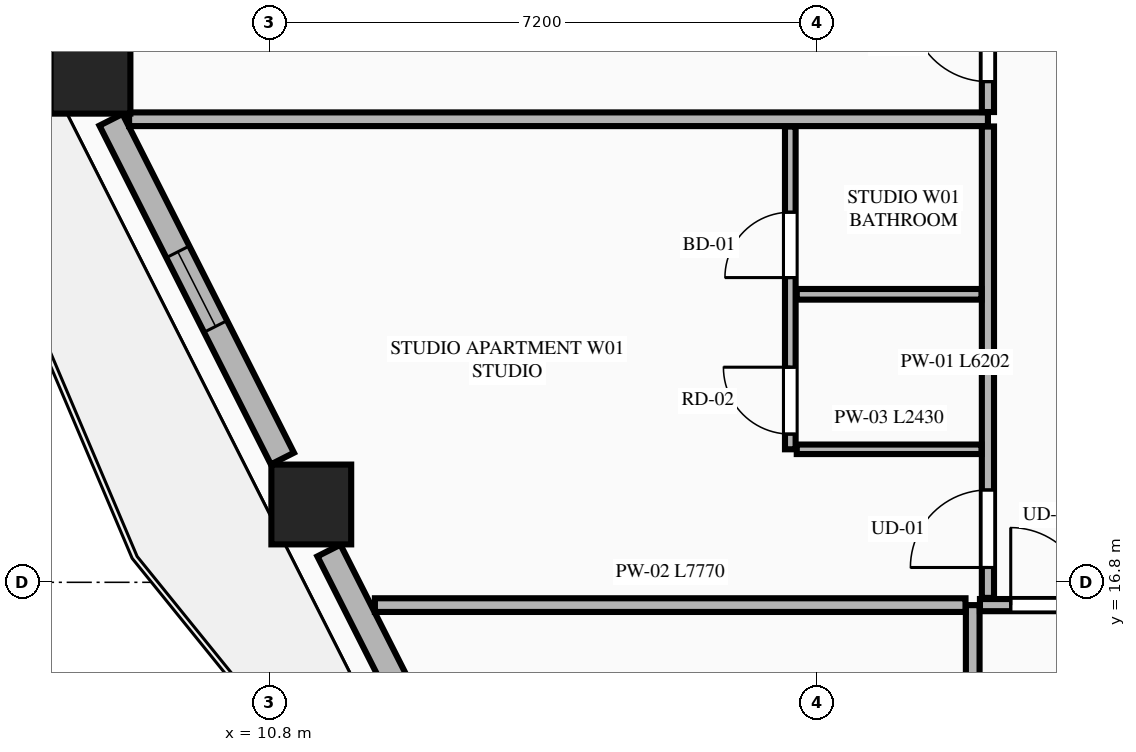
"""IFC4 building model, lengths in metres.
Left out: names, types, materials, properties, quantities, classifications, styles, units other than length and angle.
Written with IfcOpenShell. Run it as: python <this file> out.ifc"""

import sys

from ifc_helpers import new_model, si_unit, direction, frame, frame_2d, origin, origin_2d, place, context, subcontext, project, spatial, rectangle, extrude, element, fill, save


model = new_model("IFC4")
c1 = context("Model", 3, precision=1e-05, world=origin(), true_north=direction((0.0, 1.0)))
c2 = subcontext(c1, "Body", "Model", "MODEL_VIEW")
j1 = project(units=[si_unit("LENGTHUNIT", "METRE"), si_unit("PLANEANGLEUNIT", "RADIAN")], contexts=[c1])
p1 = place(None, origin())
s1 = spatial("IfcSite", under=j1, at=p1, CompositionType="ELEMENT")
p2 = place(p1, origin())
s2 = spatial("IfcBuilding", under=s1, at=p2, CompositionType="ELEMENT")
p3 = place(p2, frame((0.0, 0.0, 133.9)))
s3 = spatial("IfcBuildingStorey", under=s2, at=p3, CompositionType="ELEMENT", Elevation=133.9)
for number, where, z_axis, x_axis in (
    (1, (8.443, 23.491, 0.0), (0.0, 0.0, 1.0), (1.0, 0.0, 0.0)),
    (2, (11.348, 17.824, 0.0), (0.0, 0.0, 1.0), (1.0, 0.0, 0.0)),
):
    element("IfcColumn", number, at=place(p3, frame(where, z_axis=z_axis, x_axis=x_axis)), inside=s3, PredefinedType="COLUMN", context=c2, shape_type="SweptSolid", body=[
        extrude(rectangle(XDim=1.05, YDim=1.05, at=origin_2d()), origin(), (0.0, 0.0, 1.0), 3.55),
    ])
p4 = place(p3, frame((8.713, 22.885, 0.0), z_axis=(0.0, 0.0, 1.0), x_axis=(0.451470533039, -0.892286029139, 0.0)))
e3 = element("IfcWall", 3, at=p4, inside=s3, PredefinedType="STANDARD", context=c2, shape_type="SweptSolid", body=[
    extrude(rectangle(XDim=4.995, YDim=0.34, at=frame_2d((2.498, 0.0))), origin(), (0.0, 0.0, 1.0), 2.797),
])
p5 = place(p4, frame((1.947, 0.0, 0.75)))
e4 = element("IfcOpeningElement", 4, at=p5, cuts=e3, PredefinedType="OPENING", context=c2, shape_type="SweptSolid", body=[
    extrude(rectangle(XDim=1.1, YDim=1.897, at=frame_2d((0.55, 0.948))), frame((0.0, 0.18, 0.0), z_axis=(0.0, -1.0, 0.0), x_axis=(1.0, 0.0, 0.0)), (0.0, 0.0, 1.0), 0.36),
])
p6 = place(p3, frame((11.58, 17.218, 0.0), z_axis=(0.0, 0.0, 1.0), x_axis=(0.451567731634, -0.892236842855, 0.0)))
e5 = element("IfcWall", 5, at=p6, inside=s3, PredefinedType="STANDARD", context=c2, shape_type="SweptSolid", body=[
    extrude(rectangle(XDim=5.219, YDim=0.34, at=frame_2d((2.61, 0.0))), origin(), (0.0, 0.0, 1.0), 2.797),
])
p7 = place(p6, frame((2.587, 0.0, 0.0)))
e6 = element("IfcOpeningElement", 6, at=p7, cuts=e5, PredefinedType="OPENING", context=c2, shape_type="SweptSolid", body=[
    extrude(rectangle(XDim=1.1, YDim=2.25, at=frame_2d((0.55, 1.125))), frame((0.0, 0.18, 0.0), z_axis=(0.0, -1.0, 0.0), x_axis=(1.0, 0.0, 0.0)), (0.0, 0.0, 1.0), 0.36),
])
p8 = place(p3, frame((20.05, 4.105, 0.0), z_axis=(0.0, 0.0, 1.0), x_axis=(0.0, 1.0, 0.0)))
e7 = element("IfcWall", 7, at=p8, inside=s3, PredefinedType="PARTITIONING", context=c2, shape_type="SweptSolid", body=[
    extrude(rectangle(XDim=12.395, YDim=0.18, at=frame_2d((6.198, 0.0))), origin(), (0.0, 0.0, 1.0), 3.34),
])
p9 = place(p3, frame((20.145, 16.5, 0.0), z_axis=(0.0, 0.0, 1.0), x_axis=(1.0, 0.0, 0.0)))
e8 = element("IfcWall", 8, at=p9, inside=s3, PredefinedType="PARTITIONING", context=c2, shape_type="SweptSolid", body=[
    extrude(rectangle(XDim=8.328, YDim=0.16, at=frame_2d((4.164, 0.0))), origin(), (0.0, 0.0, 1.0), 3.34),
])
p10 = place(p9, frame((0.405, 0.0, 0.0)))
e9 = element("IfcOpeningElement", 9, at=p10, cuts=e8, PredefinedType="OPENING", context=c2, shape_type="SweptSolid", body=[
    extrude(rectangle(XDim=1.02, YDim=2.25, at=frame_2d((0.51, 1.125))), frame((0.0, 0.09, 0.0), z_axis=(0.0, -1.0, 0.0), x_axis=(1.0, 0.0, 0.0)), (0.0, 0.0, 1.0), 0.18),
])
p11 = place(p3, frame((12.185, 16.5, 0.0), z_axis=(0.0, 0.0, 1.0), x_axis=(1.0, 0.0, 0.0)))
e10 = element("IfcWall", 10, at=p11, inside=s3, PredefinedType="PARTITIONING", context=c2, shape_type="SweptSolid", body=[
    extrude(rectangle(XDim=7.77, YDim=0.18, at=frame_2d((3.885, 0.0))), origin(), (0.0, 0.0, 1.0), 3.34),
])
p12 = place(p3, frame((20.25, 16.595, 0.0), z_axis=(0.0, 0.0, 1.0), x_axis=(0.0, 1.0, 0.0)))
e11 = element("IfcWall", 11, at=p12, inside=s3, PredefinedType="PARTITIONING", context=c2, shape_type="SweptSolid", body=[
    extrude(rectangle(XDim=6.202, YDim=0.16, at=frame_2d((3.101, 0.0))), origin(), (0.0, 0.0, 1.0), 3.34),
])
p13 = place(p12, frame((0.4, 0.0, 0.0)))
e12 = element("IfcOpeningElement", 12, at=p13, cuts=e11, PredefinedType="OPENING", context=c2, shape_type="SweptSolid", body=[
    extrude(rectangle(XDim=1.02, YDim=2.25, at=frame_2d((0.51, 1.125))), frame((0.0, 0.09, 0.0), z_axis=(0.0, -1.0, 0.0), x_axis=(1.0, 0.0, 0.0)), (0.0, 0.0, 1.0), 0.18),
])
p14 = place(p3, frame((17.735, 18.55, 0.0), z_axis=(0.0, 0.0, 1.0), x_axis=(1.0, 0.0, 0.0)))
e13 = element("IfcWall", 13, at=p14, inside=s3, PredefinedType="PARTITIONING", context=c2, shape_type="SweptSolid", body=[
    extrude(rectangle(XDim=2.43, YDim=0.125, at=frame_2d((1.215, 0.0))), origin(), (0.0, 0.0, 1.0), 2.722),
])
p15 = place(p3, frame((17.65, 18.55, 0.0), z_axis=(0.0, 0.0, 1.0), x_axis=(0.0, 1.0, 0.0)))
e14 = element("IfcWall", 14, at=p15, inside=s3, PredefinedType="PLUMBINGWALL", context=c2, shape_type="SweptSolid", body=[
    extrude(rectangle(XDim=4.247, YDim=0.14, at=frame_2d((2.124, 0.0))), origin(), (0.0, 0.0, 1.0), 3.34),
])
p16 = place(p15, frame((2.259, 0.0, 0.0)))
e15 = element("IfcOpeningElement", 15, at=p16, cuts=e14, PredefinedType="OPENING", context=c2, shape_type="SweptSolid", body=[
    extrude(rectangle(XDim=0.86, YDim=2.1, at=frame_2d((0.43, 1.05))), frame((0.0, 0.08, 0.0), z_axis=(0.0, -1.0, 0.0), x_axis=(1.0, 0.0, 0.0)), (0.0, 0.0, 1.0), 0.16),
])
p17 = place(p15, frame((0.2, 0.0, 0.0)))
e16 = element("IfcOpeningElement", 16, at=p17, cuts=e14, PredefinedType="OPENING", context=c2, shape_type="SweptSolid", body=[
    extrude(rectangle(XDim=0.88, YDim=2.15, at=frame_2d((0.44, 1.075))), frame((0.0, 0.08, 0.0), z_axis=(0.0, -1.0, 0.0), x_axis=(1.0, 0.0, 0.0)), (0.0, 0.0, 1.0), 0.16),
])
p18 = place(p3, frame((17.735, 20.589, 0.0), z_axis=(0.0, 0.0, 1.0), x_axis=(1.0, 0.0, 0.0)))
e17 = element("IfcWall", 17, at=p18, inside=s3, PredefinedType="PLUMBINGWALL", context=c2, shape_type="SweptSolid", body=[
    extrude(rectangle(XDim=2.43, YDim=0.14, at=frame_2d((1.215, 0.0))), origin(), (0.0, 0.0, 1.0), 3.34),
])
p19 = place(p3, frame((8.951, 22.892, 0.0), z_axis=(0.0, 0.0, 1.0), x_axis=(1.0, 0.0, 0.0)))
e18 = element("IfcWall", 18, at=p19, inside=s3, PredefinedType="PARTITIONING", context=c2, shape_type="SweptSolid", body=[
    extrude(rectangle(XDim=11.299, YDim=0.18, at=frame_2d((5.649, 0.0))), origin(), (0.0, 0.0, 1.0), 3.34),
])
p20 = place(p3, frame((20.25, 22.987, 0.0), z_axis=(0.0, 0.0, 1.0), x_axis=(0.0, 1.0, 0.0)))
e19 = element("IfcWall", 19, at=p20, inside=s3, PredefinedType="PARTITIONING", context=c2, shape_type="SweptSolid", body=[
    extrude(rectangle(XDim=6.202, YDim=0.16, at=frame_2d((3.101, 0.0))), origin(), (0.0, 0.0, 1.0), 3.34),
])
p21 = place(p20, frame((0.4, 0.0, 0.0)))
e20 = element("IfcOpeningElement", 20, at=p21, cuts=e19, PredefinedType="OPENING", context=c2, shape_type="SweptSolid", body=[
    extrude(rectangle(XDim=1.02, YDim=2.25, at=frame_2d((0.51, 1.125))), frame((0.0, 0.09, 0.0), z_axis=(0.0, -1.0, 0.0), x_axis=(1.0, 0.0, 0.0)), (0.0, 0.0, 1.0), 0.18),
])
p22 = place(p5, origin())
e21 = element("IfcWindow", 21, at=p22, inside=s3, PartitioningType="SINGLE_PANEL", PredefinedType="WINDOW", context=c2, shape_type="SweptSolid", body=[
    extrude(rectangle(XDim=1.1, YDim=1.897, at=frame_2d((0.55, 0.948))), frame((0.0, 0.03, 0.0), z_axis=(0.0, -1.0, 0.0), x_axis=(1.0, 0.0, 0.0)), (0.0, 0.0, 1.0), 0.06),
])
fill(e4, e21)
p23 = place(p10, origin())
e22 = element("IfcDoor", 22, at=p23, inside=s3, OperationType="SINGLE_SWING_LEFT", PredefinedType="DOOR", context=c2, shape_type="SweptSolid", body=[
    extrude(rectangle(XDim=1.02, YDim=2.25, at=frame_2d((0.51, 1.125))), frame((0.0, 0.025, 0.0), z_axis=(0.0, -1.0, 0.0), x_axis=(1.0, 0.0, 0.0)), (0.0, 0.0, 1.0), 0.05),
])
fill(e9, e22)
p24 = place(p16, origin())
e23 = element("IfcDoor", 23, at=p24, inside=s3, OperationType="SINGLE_SWING_LEFT", PredefinedType="DOOR", context=c2, shape_type="SweptSolid", body=[
    extrude(rectangle(XDim=0.86, YDim=2.1, at=frame_2d((0.43, 1.05))), frame((0.0, 0.025, 0.0), z_axis=(0.0, -1.0, 0.0), x_axis=(1.0, 0.0, 0.0)), (0.0, 0.0, 1.0), 0.05),
])
fill(e15, e23)
p25 = place(p13, origin())
e24 = element("IfcDoor", 24, at=p25, inside=s3, OperationType="SINGLE_SWING_LEFT", PredefinedType="DOOR", context=c2, shape_type="SweptSolid", body=[
    extrude(rectangle(XDim=1.02, YDim=2.25, at=frame_2d((0.51, 1.125))), frame((0.0, 0.025, 0.0), z_axis=(0.0, -1.0, 0.0), x_axis=(1.0, 0.0, 0.0)), (0.0, 0.0, 1.0), 0.05),
])
fill(e12, e24)
p26 = place(p17, origin())
e25 = element("IfcDoor", 25, at=p26, inside=s3, OperationType="SINGLE_SWING_RIGHT", PredefinedType="DOOR", context=c2, shape_type="SweptSolid", body=[
    extrude(rectangle(XDim=0.88, YDim=2.15, at=frame_2d((0.44, 1.075))), frame((0.0, 0.025, 0.0), z_axis=(0.0, -1.0, 0.0), x_axis=(1.0, 0.0, 0.0)), (0.0, 0.0, 1.0), 0.05),
])
fill(e16, e25)
p27 = place(p21, origin())
e26 = element("IfcDoor", 26, at=p27, inside=s3, OperationType="SINGLE_SWING_RIGHT", PredefinedType="DOOR", context=c2, shape_type="SweptSolid", body=[
    extrude(rectangle(XDim=1.02, YDim=2.25, at=frame_2d((0.51, 1.125))), frame((0.0, 0.025, 0.0), z_axis=(0.0, -1.0, 0.0), x_axis=(1.0, 0.0, 0.0)), (0.0, 0.0, 1.0), 0.05),
])
fill(e20, e26)
save(model, sys.argv[1])
